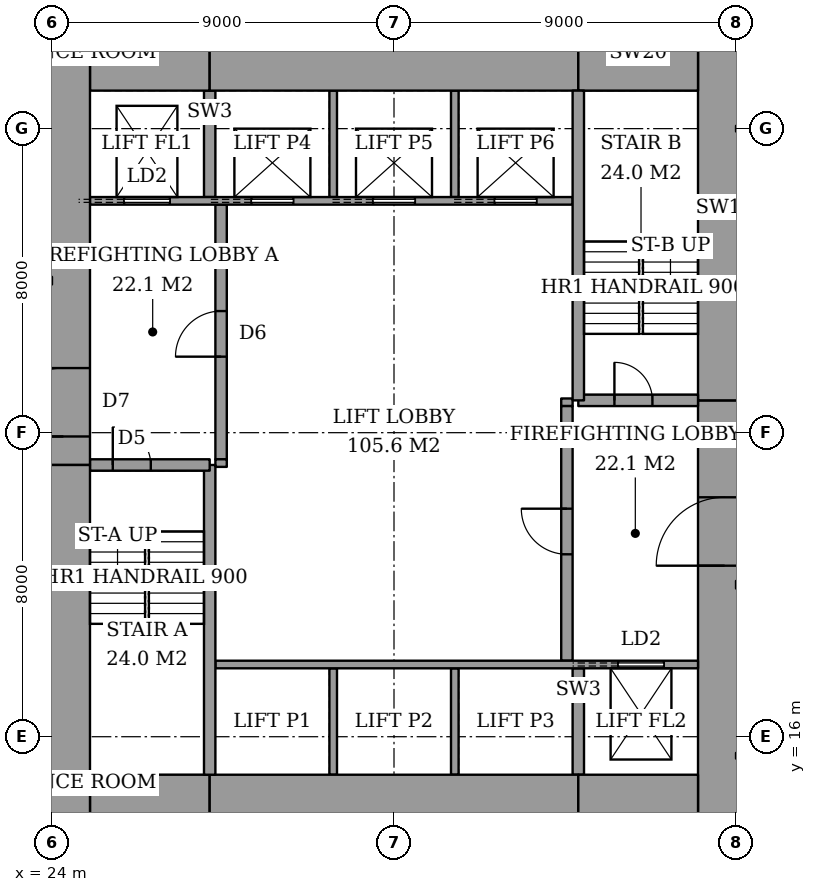
"""IFC4 building model, lengths in metres.
Left out: names, types, materials, properties, quantities, classifications, styles, units other than length and angle.
Written with IfcOpenShell. Run it as: python <this file> out.ifc"""

import sys

from ifc_helpers import new_model, si_unit, direction, frame, frame_2d, origin, place, context, subcontext, project, spatial, rectangle, extrude, element, fill, save


model = new_model("IFC4")
c1 = context("Model", 3, precision=1e-05, world=origin(), true_north=direction((0.0, 1.0)))
c2 = subcontext(c1, "Body", "Model", "MODEL_VIEW")
j1 = project(units=[si_unit("LENGTHUNIT", "METRE"), si_unit("PLANEANGLEUNIT", "RADIAN")], contexts=[c1])
p1 = place(None, origin())
s1 = spatial("IfcSite", under=j1, at=p1, CompositionType="ELEMENT")
p2 = place(p1, origin())
s2 = spatial("IfcBuilding", under=s1, at=p2, CompositionType="ELEMENT")
p3 = place(p2, frame((0.0, 0.0, 182.2)))
s3 = spatial("IfcBuildingStorey", under=s2, at=p3, CompositionType="ELEMENT", Elevation=182.2)
p4 = place(p3, frame((25.0, 14.0, 0.0), z_axis=(0.0, 0.0, 1.0), x_axis=(1.0, 0.0, 0.0)))
e1 = element("IfcWall", 1, at=p4, inside=s3, PredefinedType="SHEAR", context=c2, shape_type="SweptSolid", body=[
    extrude(rectangle(XDim=3.15, YDim=2.0, at=frame_2d((1.575, 0.0))), origin(), (0.0, 0.0, 1.0), 3.6),
])
p5 = place(p3, frame((28.15, 14.0, 0.0), z_axis=(0.0, 0.0, 1.0), x_axis=(1.0, 0.0, 0.0)))
e2 = element("IfcWall", 2, at=p5, inside=s3, PredefinedType="SHEAR", context=c2, shape_type="SweptSolid", body=[
    extrude(rectangle(XDim=9.7, YDim=2.0, at=frame_2d((4.85, 0.0))), origin(), (0.0, 0.0, 1.0), 3.6),
])
for number, where, z_axis, x_axis in (
    (3, (37.85, 14.0, 0.0), (0.0, 0.0, 1.0), (1.0, 0.0, 0.0)),
    (4, (25.0, 34.0, 0.0), (0.0, 0.0, 1.0), (1.0, 0.0, 0.0)),
):
    element("IfcWall", number, at=place(p3, frame(where, z_axis=z_axis, x_axis=x_axis)), inside=s3, PredefinedType="SHEAR", context=c2, shape_type="SweptSolid", body=[
        extrude(rectangle(XDim=3.15, YDim=2.0, at=frame_2d((1.575, 0.0))), origin(), (0.0, 0.0, 1.0), 3.6),
    ])
p6 = place(p3, frame((28.15, 34.0, 0.0), z_axis=(0.0, 0.0, 1.0), x_axis=(1.0, 0.0, 0.0)))
e5 = element("IfcWall", 5, at=p6, inside=s3, PredefinedType="SHEAR", context=c2, shape_type="SweptSolid", body=[
    extrude(rectangle(XDim=9.7, YDim=2.0, at=frame_2d((4.85, 0.0))), origin(), (0.0, 0.0, 1.0), 3.6),
])
p7 = place(p3, frame((37.85, 34.0, 0.0), z_axis=(0.0, 0.0, 1.0), x_axis=(1.0, 0.0, 0.0)))
e6 = element("IfcWall", 6, at=p7, inside=s3, PredefinedType="SHEAR", context=c2, shape_type="SweptSolid", body=[
    extrude(rectangle(XDim=3.15, YDim=2.0, at=frame_2d((1.575, 0.0))), origin(), (0.0, 0.0, 1.0), 3.6),
])
p8 = place(p3, frame((24.3, 13.0, 0.0), z_axis=(0.0, 0.0, 1.0), x_axis=(0.0, 1.0, 0.0)))
e7 = element("IfcWall", 7, at=p8, inside=s3, PredefinedType="SHEAR", context=c2, shape_type="SweptSolid", body=[
    extrude(rectangle(XDim=10.15, YDim=1.4, at=frame_2d((5.075, 0.0))), origin(), (0.0, 0.0, 1.0), 3.6),
])
p9 = place(p3, frame((24.3, 23.15, 0.0), z_axis=(0.0, 0.0, 1.0), x_axis=(0.0, 1.0, 0.0)))
e8 = element("IfcWall", 8, at=p9, inside=s3, PredefinedType="SHEAR", context=c2, shape_type="SweptSolid", body=[
    extrude(rectangle(XDim=11.85, YDim=1.4, at=frame_2d((5.925, 0.0))), origin(), (0.0, 0.0, 1.0), 3.6),
])
p10 = place(p9, frame((0.75, 0.0, 0.0)))
e9 = element("IfcOpeningElement", 9, at=p10, cuts=e8, PredefinedType="OPENING", context=c2, shape_type="SweptSolid", body=[
    extrude(rectangle(XDim=1.8, YDim=2.4, at=frame_2d((0.9, 1.2))), frame((0.0, 0.71, 0.0), z_axis=(0.0, -1.0, 0.0), x_axis=(1.0, 0.0, 0.0)), (0.0, 0.0, 1.0), 1.42),
])
p11 = place(p3, frame((41.7, 13.0, 0.0), z_axis=(0.0, 0.0, 1.0), x_axis=(0.0, 1.0, 0.0)))
e10 = element("IfcWall", 10, at=p11, inside=s3, PredefinedType="SHEAR", context=c2, shape_type="SweptSolid", body=[
    extrude(rectangle(XDim=11.85, YDim=1.4, at=frame_2d((5.925, 0.0))), origin(), (0.0, 0.0, 1.0), 3.6),
])
p12 = place(p11, frame((7.5, 0.0, 0.0)))
e11 = element("IfcOpeningElement", 11, at=p12, cuts=e10, PredefinedType="OPENING", context=c2, shape_type="SweptSolid", body=[
    extrude(rectangle(XDim=1.8, YDim=2.4, at=frame_2d((0.9, 1.2))), frame((0.0, 0.71, 0.0), z_axis=(0.0, -1.0, 0.0), x_axis=(1.0, 0.0, 0.0)), (0.0, 0.0, 1.0), 1.42),
])
p13 = place(p3, frame((41.7, 24.85, 0.0), z_axis=(0.0, 0.0, 1.0), x_axis=(0.0, 1.0, 0.0)))
e12 = element("IfcWall", 12, at=p13, inside=s3, PredefinedType="SHEAR", context=c2, shape_type="SweptSolid", body=[
    extrude(rectangle(XDim=10.15, YDim=1.4, at=frame_2d((5.075, 0.0))), origin(), (0.0, 0.0, 1.0), 3.6),
])
p14 = place(p3, frame((28.15, 15.0, 0.0), z_axis=(0.0, 0.0, 1.0), x_axis=(0.0, 1.0, 0.0)))
e13 = element("IfcWall", 13, at=p14, inside=s3, PredefinedType="SHEAR", context=c2, shape_type="SweptSolid", body=[
    extrude(rectangle(XDim=8.15, YDim=0.3, at=frame_2d((4.075, 0.0))), origin(), (0.0, 0.0, 1.0), 3.6),
])
p15 = place(p3, frame((25.0, 23.15, 0.0), z_axis=(0.0, 0.0, 1.0), x_axis=(1.0, 0.0, 0.0)))
e14 = element("IfcWall", 14, at=p15, inside=s3, PredefinedType="SHEAR", context=c2, shape_type="SweptSolid", body=[
    extrude(rectangle(XDim=3.15, YDim=0.3, at=frame_2d((1.575, 0.0))), origin(), (0.0, 0.0, 1.0), 3.6),
])
p16 = place(p15, frame((0.6, 0.0, 0.0)))
e15 = element("IfcOpeningElement", 15, at=p16, cuts=e14, PredefinedType="OPENING", context=c2, shape_type="SweptSolid", body=[
    extrude(rectangle(XDim=1.0, YDim=2.1, at=frame_2d((0.5, 1.05))), frame((0.0, 0.16, 0.0), z_axis=(0.0, -1.0, 0.0), x_axis=(1.0, 0.0, 0.0)), (0.0, 0.0, 1.0), 0.32),
])
p17 = place(p3, frame((37.85, 24.85, 0.0), z_axis=(0.0, 0.0, 1.0), x_axis=(0.0, 1.0, 0.0)))
e16 = element("IfcWall", 16, at=p17, inside=s3, PredefinedType="SHEAR", context=c2, shape_type="SweptSolid", body=[
    extrude(rectangle(XDim=8.15, YDim=0.3, at=frame_2d((4.075, 0.0))), origin(), (0.0, 0.0, 1.0), 3.6),
])
p18 = place(p3, frame((37.85, 24.85, 0.0), z_axis=(0.0, 0.0, 1.0), x_axis=(1.0, 0.0, 0.0)))
e17 = element("IfcWall", 17, at=p18, inside=s3, PredefinedType="SHEAR", context=c2, shape_type="SweptSolid", body=[
    extrude(rectangle(XDim=3.15, YDim=0.3, at=frame_2d((1.575, 0.0))), origin(), (0.0, 0.0, 1.0), 3.6),
])
p19 = place(p18, frame((0.95, 0.0, 0.0)))
e18 = element("IfcOpeningElement", 18, at=p19, cuts=e17, PredefinedType="OPENING", context=c2, shape_type="SweptSolid", body=[
    extrude(rectangle(XDim=1.0, YDim=2.1, at=frame_2d((0.5, 1.05))), frame((0.0, 0.16, 0.0), z_axis=(0.0, -1.0, 0.0), x_axis=(1.0, 0.0, 0.0)), (0.0, 0.0, 1.0), 0.32),
])
p20 = place(p3, frame((28.45, 23.3, 0.0), z_axis=(0.0, 0.0, 1.0), x_axis=(0.0, 1.0, 0.0)))
e19 = element("IfcWall", 19, at=p20, inside=s3, PredefinedType="PARTITIONING", context=c2, shape_type="SweptSolid", body=[
    extrude(rectangle(XDim=6.7, YDim=0.3, at=frame_2d((3.35, 0.0))), origin(), (0.0, 0.0, 1.0), 3.6),
])
p21 = place(p20, frame((2.7, 0.0, 0.0)))
e20 = element("IfcOpeningElement", 20, at=p21, cuts=e19, PredefinedType="OPENING", context=c2, shape_type="SweptSolid", body=[
    extrude(rectangle(XDim=1.2, YDim=2.1, at=frame_2d((0.6, 1.05))), frame((0.0, 0.16, 0.0), z_axis=(0.0, -1.0, 0.0), x_axis=(1.0, 0.0, 0.0)), (0.0, 0.0, 1.0), 0.32),
])
p22 = place(p3, frame((37.55, 18.0, 0.0), z_axis=(0.0, 0.0, 1.0), x_axis=(0.0, 1.0, 0.0)))
e21 = element("IfcWall", 21, at=p22, inside=s3, PredefinedType="PARTITIONING", context=c2, shape_type="SweptSolid", body=[
    extrude(rectangle(XDim=6.7, YDim=0.3, at=frame_2d((3.35, 0.0))), origin(), (0.0, 0.0, 1.0), 3.6),
])
p23 = place(p22, frame((2.8, 0.0, 0.0)))
e22 = element("IfcOpeningElement", 22, at=p23, cuts=e21, PredefinedType="OPENING", context=c2, shape_type="SweptSolid", body=[
    extrude(rectangle(XDim=1.2, YDim=2.1, at=frame_2d((0.6, 1.05))), frame((0.0, 0.16, 0.0), z_axis=(0.0, -1.0, 0.0), x_axis=(1.0, 0.0, 0.0)), (0.0, 0.0, 1.0), 0.32),
])
p24 = place(p3, frame((28.3, 17.9, 0.0), z_axis=(0.0, 0.0, 1.0), x_axis=(1.0, 0.0, 0.0)))
e23 = element("IfcWall", 23, at=p24, inside=s3, PredefinedType="PARTITIONING", context=c2, shape_type="SweptSolid", body=[
    extrude(rectangle(XDim=12.7, YDim=0.2, at=frame_2d((6.35, 0.0))), origin(), (0.0, 0.0, 1.0), 3.6),
])
p25 = place(p24, frame((10.6, 0.0, 0.0)))
e24 = element("IfcOpeningElement", 24, at=p25, cuts=e23, PredefinedType="OPENING", context=c2, shape_type="SweptSolid", body=[
    extrude(rectangle(XDim=1.2, YDim=2.1, at=frame_2d((0.6, 1.05))), frame((0.0, 0.11, 0.0), z_axis=(0.0, -1.0, 0.0), x_axis=(1.0, 0.0, 0.0)), (0.0, 0.0, 1.0), 0.22),
])
p26 = place(p3, frame((25.0, 30.1, 0.0), z_axis=(0.0, 0.0, 1.0), x_axis=(1.0, 0.0, 0.0)))
e25 = element("IfcWall", 25, at=p26, inside=s3, PredefinedType="PARTITIONING", context=c2, shape_type="SweptSolid", body=[
    extrude(rectangle(XDim=12.7, YDim=0.2, at=frame_2d((6.35, 0.0))), origin(), (0.0, 0.0, 1.0), 3.6),
])
p27 = place(p26, frame((4.25, 0.0, 0.0)))
e26 = element("IfcOpeningElement", 26, at=p27, cuts=e25, PredefinedType="OPENING", context=c2, shape_type="SweptSolid", body=[
    extrude(rectangle(XDim=1.1, YDim=2.1, at=frame_2d((0.55, 1.05))), frame((0.0, 0.11, 0.0), z_axis=(0.0, -1.0, 0.0), x_axis=(1.0, 0.0, 0.0)), (0.0, 0.0, 1.0), 0.22),
])
p28 = place(p26, frame((7.45, 0.0, 0.0)))
e27 = element("IfcOpeningElement", 27, at=p28, cuts=e25, PredefinedType="OPENING", context=c2, shape_type="SweptSolid", body=[
    extrude(rectangle(XDim=1.1, YDim=2.1, at=frame_2d((0.55, 1.05))), frame((0.0, 0.11, 0.0), z_axis=(0.0, -1.0, 0.0), x_axis=(1.0, 0.0, 0.0)), (0.0, 0.0, 1.0), 0.22),
])
p29 = place(p26, frame((10.65, 0.0, 0.0)))
e28 = element("IfcOpeningElement", 28, at=p29, cuts=e25, PredefinedType="OPENING", context=c2, shape_type="SweptSolid", body=[
    extrude(rectangle(XDim=1.1, YDim=2.1, at=frame_2d((0.55, 1.05))), frame((0.0, 0.11, 0.0), z_axis=(0.0, -1.0, 0.0), x_axis=(1.0, 0.0, 0.0)), (0.0, 0.0, 1.0), 0.22),
])
p30 = place(p26, frame((0.9, 0.0, 0.0)))
e29 = element("IfcOpeningElement", 29, at=p30, cuts=e25, PredefinedType="OPENING", context=c2, shape_type="SweptSolid", body=[
    extrude(rectangle(XDim=1.2, YDim=2.1, at=frame_2d((0.6, 1.05))), frame((0.0, 0.11, 0.0), z_axis=(0.0, -1.0, 0.0), x_axis=(1.0, 0.0, 0.0)), (0.0, 0.0, 1.0), 0.22),
])
for number, where, z_axis, x_axis in (
    (30, (31.4, 15.0, 0.0), (0.0, 0.0, 1.0), (0.0, 1.0, 0.0)),
    (31, (34.6, 15.0, 0.0), (0.0, 0.0, 1.0), (0.0, 1.0, 0.0)),
):
    element("IfcWall", number, at=place(p3, frame(where, z_axis=z_axis, x_axis=x_axis)), inside=s3, PredefinedType="PARTITIONING", context=c2, shape_type="SweptSolid", body=[
        extrude(rectangle(XDim=2.8, YDim=0.2, at=frame_2d((1.4, 0.0))), origin(), (0.0, 0.0, 1.0), 3.6),
    ])
p31 = place(p3, frame((37.85, 15.0, 0.0), z_axis=(0.0, 0.0, 1.0), x_axis=(0.0, 1.0, 0.0)))
e32 = element("IfcWall", 32, at=p31, inside=s3, PredefinedType="SHEAR", context=c2, shape_type="SweptSolid", body=[
    extrude(rectangle(XDim=2.8, YDim=0.3, at=frame_2d((1.4, 0.0))), origin(), (0.0, 0.0, 1.0), 3.6),
])
for number, where, z_axis, x_axis in (
    (33, (31.4, 30.2, 0.0), (0.0, 0.0, 1.0), (0.0, 1.0, 0.0)),
    (34, (34.6, 30.2, 0.0), (0.0, 0.0, 1.0), (0.0, 1.0, 0.0)),
):
    element("IfcWall", number, at=place(p3, frame(where, z_axis=z_axis, x_axis=x_axis)), inside=s3, PredefinedType="PARTITIONING", context=c2, shape_type="SweptSolid", body=[
        extrude(rectangle(XDim=2.8, YDim=0.2, at=frame_2d((1.4, 0.0))), origin(), (0.0, 0.0, 1.0), 3.6),
    ])
p32 = place(p3, frame((28.15, 30.2, 0.0), z_axis=(0.0, 0.0, 1.0), x_axis=(0.0, 1.0, 0.0)))
e35 = element("IfcWall", 35, at=p32, inside=s3, PredefinedType="SHEAR", context=c2, shape_type="SweptSolid", body=[
    extrude(rectangle(XDim=2.8, YDim=0.3, at=frame_2d((1.4, 0.0))), origin(), (0.0, 0.0, 1.0), 3.6),
])
for number, where, z_axis, x_axis in (
    (36, (28.3, 23.2, 0.0), (0.0, 0.0, 1.0), (1.0, 0.0, 0.0)),
    (37, (37.4, 24.8, 0.0), (0.0, 0.0, 1.0), (1.0, 0.0, 0.0)),
):
    element("IfcWall", number, at=place(p3, frame(where, z_axis=z_axis, x_axis=x_axis)), inside=s3, PredefinedType="PARTITIONING", context=c2, shape_type="SweptSolid", body=[
        extrude(rectangle(XDim=0.3, YDim=0.2, at=frame_2d((0.15, 0.0))), origin(), (0.0, 0.0, 1.0), 3.6),
    ])
p33 = place(p16, origin())
e38 = element("IfcDoor", 38, at=p33, inside=s3, OperationType="SINGLE_SWING_RIGHT", PredefinedType="DOOR", context=c2, shape_type="SweptSolid", body=[
    extrude(rectangle(XDim=1.0, YDim=2.1, at=frame_2d((0.5, 1.05))), frame((0.0, 0.025, 0.0), z_axis=(0.0, -1.0, 0.0), x_axis=(1.0, 0.0, 0.0)), (0.0, 0.0, 1.0), 0.05),
])
fill(e15, e38)
p34 = place(p19, origin())
e39 = element("IfcDoor", 39, at=p34, inside=s3, OperationType="SINGLE_SWING_RIGHT", PredefinedType="DOOR", context=c2, shape_type="SweptSolid", body=[
    extrude(rectangle(XDim=1.0, YDim=2.1, at=frame_2d((0.5, 1.05))), frame((0.0, 0.025, 0.0), z_axis=(0.0, -1.0, 0.0), x_axis=(1.0, 0.0, 0.0)), (0.0, 0.0, 1.0), 0.05),
])
fill(e18, e39)
p35 = place(p21, origin())
e40 = element("IfcDoor", 40, at=p35, inside=s3, OperationType="SINGLE_SWING_RIGHT", PredefinedType="DOOR", context=c2, shape_type="SweptSolid", body=[
    extrude(rectangle(XDim=1.2, YDim=2.1, at=frame_2d((0.6, 1.05))), frame((0.0, 0.025, 0.0), z_axis=(0.0, -1.0, 0.0), x_axis=(1.0, 0.0, 0.0)), (0.0, 0.0, 1.0), 0.05),
])
fill(e20, e40)
p36 = place(p23, origin())
e41 = element("IfcDoor", 41, at=p36, inside=s3, OperationType="SINGLE_SWING_LEFT", PredefinedType="DOOR", context=c2, shape_type="SweptSolid", body=[
    extrude(rectangle(XDim=1.2, YDim=2.1, at=frame_2d((0.6, 1.05))), frame((0.0, 0.025, 0.0), z_axis=(0.0, -1.0, 0.0), x_axis=(1.0, 0.0, 0.0)), (0.0, 0.0, 1.0), 0.05),
])
fill(e22, e41)
p37 = place(p10, origin())
e42 = element("IfcDoor", 42, at=p37, inside=s3, OperationType="DOUBLE_DOOR_DOUBLE_SWING", PredefinedType="DOOR", context=c2, shape_type="SweptSolid", body=[
    extrude(rectangle(XDim=1.8, YDim=2.4, at=frame_2d((0.9, 1.2))), frame((0.0, 0.025, 0.0), z_axis=(0.0, -1.0, 0.0), x_axis=(1.0, 0.0, 0.0)), (0.0, 0.0, 1.0), 0.05),
])
fill(e9, e42)
p38 = place(p12, origin())
e43 = element("IfcDoor", 43, at=p38, inside=s3, OperationType="DOUBLE_DOOR_DOUBLE_SWING", PredefinedType="DOOR", context=c2, shape_type="SweptSolid", body=[
    extrude(rectangle(XDim=1.8, YDim=2.4, at=frame_2d((0.9, 1.2))), frame((0.0, 0.025, 0.0), z_axis=(0.0, -1.0, 0.0), x_axis=(1.0, 0.0, 0.0)), (0.0, 0.0, 1.0), 0.05),
])
fill(e11, e43)
p39 = place(p27, origin())
e44 = element("IfcDoor", 44, at=p39, inside=s3, OperationType="SLIDING_TO_LEFT", PredefinedType="DOOR", context=c2, shape_type="SweptSolid", body=[
    extrude(rectangle(XDim=1.1, YDim=2.1, at=frame_2d((0.55, 1.05))), frame((0.0, 0.025, 0.0), z_axis=(0.0, -1.0, 0.0), x_axis=(1.0, 0.0, 0.0)), (0.0, 0.0, 1.0), 0.05),
])
fill(e26, e44)
p40 = place(p28, origin())
e45 = element("IfcDoor", 45, at=p40, inside=s3, OperationType="SLIDING_TO_LEFT", PredefinedType="DOOR", context=c2, shape_type="SweptSolid", body=[
    extrude(rectangle(XDim=1.1, YDim=2.1, at=frame_2d((0.55, 1.05))), frame((0.0, 0.025, 0.0), z_axis=(0.0, -1.0, 0.0), x_axis=(1.0, 0.0, 0.0)), (0.0, 0.0, 1.0), 0.05),
])
fill(e27, e45)
p41 = place(p29, origin())
e46 = element("IfcDoor", 46, at=p41, inside=s3, OperationType="SLIDING_TO_LEFT", PredefinedType="DOOR", context=c2, shape_type="SweptSolid", body=[
    extrude(rectangle(XDim=1.1, YDim=2.1, at=frame_2d((0.55, 1.05))), frame((0.0, 0.025, 0.0), z_axis=(0.0, -1.0, 0.0), x_axis=(1.0, 0.0, 0.0)), (0.0, 0.0, 1.0), 0.05),
])
fill(e28, e46)
p42 = place(p30, origin())
e47 = element("IfcDoor", 47, at=p42, inside=s3, OperationType="SLIDING_TO_LEFT", PredefinedType="DOOR", context=c2, shape_type="SweptSolid", body=[
    extrude(rectangle(XDim=1.2, YDim=2.1, at=frame_2d((0.6, 1.05))), frame((0.0, 0.025, 0.0), z_axis=(0.0, -1.0, 0.0), x_axis=(1.0, 0.0, 0.0)), (0.0, 0.0, 1.0), 0.05),
])
fill(e29, e47)
p43 = place(p25, origin())
e48 = element("IfcDoor", 48, at=p43, inside=s3, OperationType="SLIDING_TO_LEFT", PredefinedType="DOOR", context=c2, shape_type="SweptSolid", body=[
    extrude(rectangle(XDim=1.2, YDim=2.1, at=frame_2d((0.6, 1.05))), frame((0.0, 0.025, 0.0), z_axis=(0.0, -1.0, 0.0), x_axis=(1.0, 0.0, 0.0)), (0.0, 0.0, 1.0), 0.05),
])
fill(e24, e48)
save(model, sys.argv[1])
